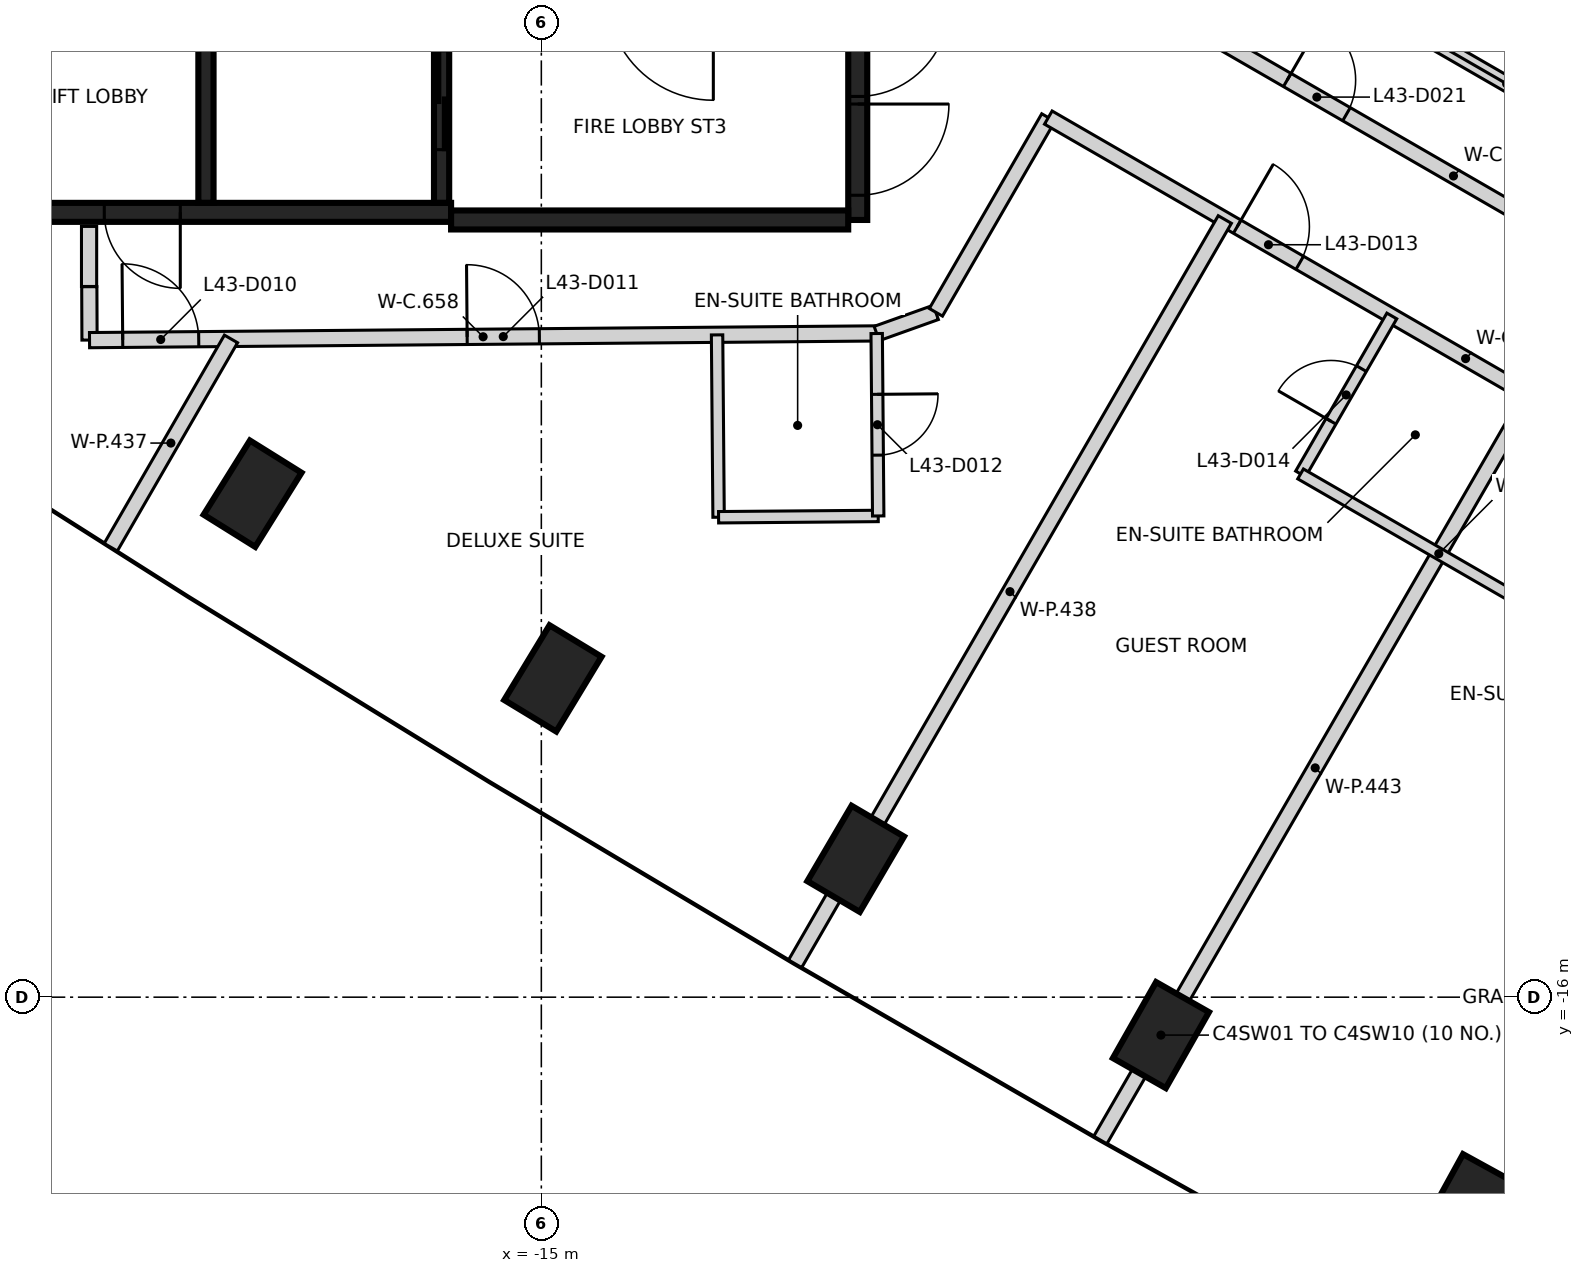
"""IFC4 building model, lengths in metres.
Left out: names, types, materials, properties, quantities, classifications, styles, units other than length and angle.
Written with IfcOpenShell. Run it as: python <this file> out.ifc"""

import sys

from ifc_helpers import new_model, si_unit, direction, frame, frame_2d, origin, origin_2d, place, context, subcontext, project, spatial, rectangle, extrude, element, fill, save


model = new_model("IFC4")
c1 = context("Model", 3, precision=1e-05, world=origin(), true_north=direction((0.0, 1.0)))
c2 = subcontext(c1, "Body", "Model", "MODEL_VIEW")
j1 = project(units=[si_unit("LENGTHUNIT", "METRE"), si_unit("PLANEANGLEUNIT", "RADIAN")], contexts=[c1])
p1 = place(None, origin())
s1 = spatial("IfcSite", under=j1, at=p1, CompositionType="ELEMENT")
p2 = place(p1, origin())
s2 = spatial("IfcBuilding", under=s1, at=p2, CompositionType="ELEMENT")
p3 = place(p2, frame((0.0, 0.0, 175.6)))
s3 = spatial("IfcBuildingStorey", under=s2, at=p3, CompositionType="ELEMENT", Elevation=175.6)
for number, where, z_axis, x_axis in (
    (1, (-18.799, -9.376, -0.35), (0.0, 0.0, 1.0), (0.529, 0.848, 0.0)),
    (2, (-14.848, -11.806, -0.35), (0.0, 0.0, 1.0), (0.518, 0.855, 0.0)),
    (3, (-10.864, -14.18, -0.35), (0.0, 0.0, 1.0), (0.506, 0.862, 0.0)),
    (4, (-6.848, -16.499, -0.35), (0.0, 0.0, 1.0), (0.494, 0.87, 0.0)),
    (5, (-2.8, -18.762, -0.35), (0.0, 0.0, 1.0), (0.482, 0.876, 0.0)),
):
    element("IfcColumn", number, at=place(p3, frame(where, z_axis=z_axis, x_axis=x_axis)), inside=s3, PredefinedType="COLUMN", context=c2, shape_type="SweptSolid", body=[
        extrude(rectangle(XDim=1.15, YDim=0.8, at=origin_2d()), origin(), (0.0, 0.0, 1.0), 3.6),
    ])
p4 = place(p3, frame((-10.837, 5.775, 0.0), z_axis=(0.0, 0.0, 1.0), x_axis=(0.0, -1.0, 0.0)))
e6 = element("IfcWall", 6, at=p4, inside=s3, PredefinedType="SHEAR", context=c2, shape_type="SweptSolid", body=[
    extrude(rectangle(XDim=11.55, YDim=0.25, at=frame_2d((5.775, 0.0))), origin(), (0.0, 0.0, 1.0), 3.25),
])
p5 = place(p4, frame((10.025, 0.0, 0.0)))
e7 = element("IfcOpeningElement", 7, at=p5, cuts=e6, PredefinedType="OPENING", context=c2, shape_type="SweptSolid", body=[
    extrude(rectangle(XDim=1.2, YDim=2.1, at=frame_2d((0.6, 1.05))), frame((0.0, 0.135, 0.0), z_axis=(0.0, -1.0, 0.0), x_axis=(1.0, 0.0, 0.0)), (0.0, 0.0, 1.0), 0.27),
])
p6 = place(p4, frame((8.725, 0.0, 0.0)))
e8 = element("IfcOpeningElement", 8, at=p6, cuts=e6, PredefinedType="OPENING", context=c2, shape_type="SweptSolid", body=[
    extrude(rectangle(XDim=1.2, YDim=2.1, at=frame_2d((0.6, 1.05))), frame((0.0, 0.135, 0.0), z_axis=(0.0, -1.0, 0.0), x_axis=(1.0, 0.0, 0.0)), (0.0, 0.0, 1.0), 0.27),
])
p7 = place(p3, frame((-16.187, -5.675, 0.0), z_axis=(0.0, 0.0, 1.0), x_axis=(-1.0, 0.0, 0.0)))
e9 = element("IfcWall", 9, at=p7, inside=s3, PredefinedType="SHEAR", context=c2, shape_type="SweptSolid", body=[
    extrude(rectangle(XDim=6.25, YDim=0.25, at=frame_2d((3.125, 0.0))), origin(), (0.0, 0.0, 1.0), 3.25),
])
p8 = place(p7, frame((3.563, 0.0, 0.0)))
e10 = element("IfcOpeningElement", 10, at=p8, cuts=e9, PredefinedType="OPENING", context=c2, shape_type="SweptSolid", body=[
    extrude(rectangle(XDim=1.0, YDim=2.1, at=frame_2d((0.5, 1.05))), frame((0.0, 0.135, 0.0), z_axis=(0.0, -1.0, 0.0), x_axis=(1.0, 0.0, 0.0)), (0.0, 0.0, 1.0), 0.27),
])
p9 = place(p3, frame((-10.963, -5.775, 0.0), z_axis=(0.0, 0.0, 1.0), x_axis=(-1.0, 0.0, 0.0)))
e11 = element("IfcWall", 11, at=p9, inside=s3, PredefinedType="SHEAR", context=c2, shape_type="SweptSolid", body=[
    extrude(rectangle(XDim=5.225, YDim=0.25, at=frame_2d((2.612, 0.0))), origin(), (0.0, 0.0, 1.0), 3.25),
])
p10 = place(p3, frame((-16.312, -2.898, 0.0), z_axis=(0.0, 0.0, 1.0), x_axis=(0.0, -1.0, 0.0)))
e12 = element("IfcWall", 12, at=p10, inside=s3, PredefinedType="SHEAR", context=c2, shape_type="SweptSolid", body=[
    extrude(rectangle(XDim=2.651, YDim=0.2, at=frame_2d((1.325, 0.0))), origin(), (0.0, 0.0, 1.0), 3.25),
])
p11 = place(p10, frame((0.652, 0.0, 0.0)))
e13 = element("IfcOpeningElement", 13, at=p11, cuts=e12, PredefinedType="OPENING", context=c2, shape_type="SweptSolid", body=[
    extrude(rectangle(XDim=1.3, YDim=2.1, at=frame_2d((0.65, 1.05))), frame((0.0, 0.11, 0.0), z_axis=(0.0, -1.0, 0.0), x_axis=(1.0, 0.0, 0.0)), (0.0, 0.0, 1.0), 0.22),
])
p12 = place(p3, frame((-19.412, -5.549, 0.0), z_axis=(0.0, 0.0, 1.0), x_axis=(0.0, 1.0, 0.0)))
e14 = element("IfcWall", 14, at=p12, inside=s3, PredefinedType="SHEAR", context=c2, shape_type="SweptSolid", body=[
    extrude(rectangle(XDim=2.651, YDim=0.2, at=frame_2d((1.325, 0.0))), origin(), (0.0, 0.0, 1.0), 3.25),
])
p13 = place(p3, frame((-20.95, -6.65, 0.0), z_axis=(0.0, 0.0, 1.0), x_axis=(0.0, 1.0, 0.0)))
e15 = element("IfcWall", 15, at=p13, inside=s3, PredefinedType="PARTITIONING", context=c2, shape_type="SweptSolid", body=[
    extrude(rectangle(XDim=0.79, YDim=0.2, at=frame_2d((0.395, 0.0))), origin(), (0.0, 0.0, 1.0), 3.25),
])
p14 = place(p3, frame((-20.947, -6.653, 0.0), z_axis=(0.0, 0.0, 1.0), x_axis=(0.004173876686, -0.999991289339, 0.0)))
e16 = element("IfcWall", 16, at=p14, inside=s3, PredefinedType="PARTITIONING", context=c2, shape_type="SweptSolid", body=[
    extrude(rectangle(XDim=0.702, YDim=0.2, at=frame_2d((0.351, 0.0))), origin(), (0.0, 0.0, 1.0), 3.25),
])
p15 = place(p3, frame((-20.944, -7.356, 0.0), z_axis=(0.0, 0.0, 1.0), x_axis=(0.999963588164, 0.008533600955, 0.0)))
e17 = element("IfcWall", 17, at=p15, inside=s3, PredefinedType="PARTITIONING", context=c2, shape_type="SweptSolid", body=[
    extrude(rectangle(XDim=10.357, YDim=0.2, at=frame_2d((5.178, 0.0))), origin(), (0.0, 0.0, 1.0), 3.25),
])
p16 = place(p15, frame((0.437, 0.0, 0.0)))
e18 = element("IfcOpeningElement", 18, at=p16, cuts=e17, PredefinedType="OPENING", context=c2, shape_type="SweptSolid", body=[
    extrude(rectangle(XDim=1.0, YDim=2.1, at=frame_2d((0.5, 1.05))), frame((0.0, 0.11, 0.0), z_axis=(0.0, -1.0, 0.0), x_axis=(1.0, 0.0, 0.0)), (0.0, 0.0, 1.0), 0.22),
])
p17 = place(p15, frame((4.968, 0.0, 0.0)))
e19 = element("IfcOpeningElement", 19, at=p17, cuts=e17, PredefinedType="OPENING", context=c2, shape_type="SweptSolid", body=[
    extrude(rectangle(XDim=0.95, YDim=2.1, at=frame_2d((0.475, 1.05))), frame((0.0, 0.11, 0.0), z_axis=(0.0, -1.0, 0.0), x_axis=(1.0, 0.0, 0.0)), (0.0, 0.0, 1.0), 0.22),
])
p18 = place(p3, frame((-10.588, -7.269, 0.0), z_axis=(0.0, 0.0, 1.0), x_axis=(0.941634876095, 0.336635945974, 0.0)))
e20 = element("IfcWall", 20, at=p18, inside=s3, PredefinedType="PARTITIONING", context=c2, shape_type="SweptSolid", body=[
    extrude(rectangle(XDim=0.826, YDim=0.2, at=frame_2d((0.413, 0.0))), origin(), (0.0, 0.0, 1.0), 3.25),
])
p19 = place(p3, frame((-9.809, -6.99, 0.0), z_axis=(0.0, 0.0, 1.0), x_axis=(0.499955822529, 0.866050908157, 0.0)))
e21 = element("IfcWall", 21, at=p19, inside=s3, PredefinedType="PARTITIONING", context=c2, shape_type="SweptSolid", body=[
    extrude(rectangle(XDim=2.958, YDim=0.2, at=frame_2d((1.479, 0.0))), origin(), (0.0, 0.0, 1.0), 3.25),
])
p20 = place(p3, frame((-8.612, -1.956, 0.0), z_axis=(0.0, 0.0, 1.0), x_axis=(0.866034386606, -0.499984440973, 0.0)))
e22 = element("IfcWall", 22, at=p20, inside=s3, PredefinedType="PARTITIONING", context=c2, shape_type="SweptSolid", body=[
    extrude(rectangle(XDim=12.96, YDim=0.2, at=frame_2d((6.48, 0.0))), origin(), (0.0, 0.0, 1.0), 3.25),
])
p21 = place(p20, frame((3.955, 0.0, 0.0)))
e23 = element("IfcOpeningElement", 23, at=p21, cuts=e22, PredefinedType="OPENING", context=c2, shape_type="SweptSolid", body=[
    extrude(rectangle(XDim=0.9, YDim=2.1, at=frame_2d((0.45, 1.05))), frame((0.0, 0.11, 0.0), z_axis=(0.0, -1.0, 0.0), x_axis=(1.0, 0.0, 0.0)), (0.0, 0.0, 1.0), 0.22),
])
p22 = place(p20, frame((10.424, 0.0, 0.0)))
e24 = element("IfcOpeningElement", 24, at=p22, cuts=e22, PredefinedType="OPENING", context=c2, shape_type="SweptSolid", body=[
    extrude(rectangle(XDim=0.9, YDim=2.1, at=frame_2d((0.45, 1.05))), frame((0.0, 0.11, 0.0), z_axis=(0.0, -1.0, 0.0), x_axis=(1.0, 0.0, 0.0)), (0.0, 0.0, 1.0), 0.22),
])
p23 = place(p3, frame((-8.33, -4.428, 0.0), z_axis=(0.0, 0.0, 1.0), x_axis=(0.865923263811, -0.500176869909, 0.0)))
e25 = element("IfcWall", 25, at=p23, inside=s3, PredefinedType="PARTITIONING", context=c2, shape_type="SweptSolid", body=[
    extrude(rectangle(XDim=12.68, YDim=0.2, at=frame_2d((6.34, 0.0))), origin(), (0.0, 0.0, 1.0), 3.25),
])
p24 = place(p23, frame((2.87, 0.0, 0.0)))
e26 = element("IfcOpeningElement", 26, at=p24, cuts=e25, PredefinedType="OPENING", context=c2, shape_type="SweptSolid", body=[
    extrude(rectangle(XDim=0.95, YDim=2.1, at=frame_2d((0.475, 1.05))), frame((0.0, 0.11, 0.0), z_axis=(0.0, -1.0, 0.0), x_axis=(1.0, 0.0, 0.0)), (0.0, 0.0, 1.0), 0.22),
])
p25 = place(p23, frame((11.5, 0.0, 0.0)))
e27 = element("IfcOpeningElement", 27, at=p25, cuts=e25, PredefinedType="OPENING", context=c2, shape_type="SweptSolid", body=[
    extrude(rectangle(XDim=0.95, YDim=2.1, at=frame_2d((0.475, 1.05))), frame((0.0, 0.11, 0.0), z_axis=(0.0, -1.0, 0.0), x_axis=(1.0, 0.0, 0.0)), (0.0, 0.0, 1.0), 0.22),
])
p26 = place(p3, frame((-20.665, -10.08, 0.0), z_axis=(0.0, 0.0, 1.0), x_axis=(0.499931743679, 0.866064808003, 0.0)))
e28 = element("IfcWall", 28, at=p26, inside=s3, PredefinedType="PARTITIONING", context=c2, shape_type="SweptSolid", body=[
    extrude(rectangle(XDim=3.164, YDim=0.2, at=frame_2d((1.582, 0.0))), origin(), (0.0, 0.0, 1.0), 2.35),
])
p27 = place(p3, frame((-11.661, -15.561, 0.0), z_axis=(0.0, 0.0, 1.0), x_axis=(0.500012795616, 0.866018016106, 0.0)))
e29 = element("IfcWall", 29, at=p27, inside=s3, PredefinedType="PARTITIONING", context=c2, shape_type="SweptSolid", body=[
    extrude(rectangle(XDim=11.306, YDim=0.2, at=frame_2d((5.653, 0.0))), origin(), (0.0, 0.0, 1.0), 3.25),
])
p28 = place(p3, frame((-7.6, -0.924, 0.0), z_axis=(0.0, 0.0, 1.0), x_axis=(0.866028806638, -0.499994106039, 0.0)))
e30 = element("IfcWall", 30, at=p28, inside=s3, PredefinedType="PARTITIONING", context=c2, shape_type="SweptSolid", body=[
    extrude(rectangle(XDim=12.24, YDim=0.2, at=frame_2d((6.12, 0.0))), origin(), (0.0, 0.0, 1.0), 3.25),
])
p29 = place(p3, frame((-7.646, -17.879, 0.0), z_axis=(0.0, 0.0, 1.0), x_axis=(0.500031496802, 0.866007218334, 0.0)))
e31 = element("IfcWall", 31, at=p29, inside=s3, PredefinedType="PARTITIONING", context=c2, shape_type="SweptSolid", body=[
    extrude(rectangle(XDim=11.306, YDim=0.2, at=frame_2d((5.653, 0.0))), origin(), (0.0, 0.0, 1.0), 3.25),
])
p30 = place(p3, frame((-12.688, -7.287, 0.0), z_axis=(0.0, 0.0, 1.0), x_axis=(0.00834491602, -0.999965180582, 0.0)))
e32 = element("IfcWall", 32, at=p30, inside=s3, PredefinedType="PARTITIONING", context=c2, shape_type="SweptSolid", body=[
    extrude(rectangle(XDim=2.399, YDim=0.15, at=frame_2d((1.199, 0.0))), origin(), (0.0, 0.0, 1.0), 3.25),
])
p31 = place(p3, frame((-12.668, -9.686, 0.0), z_axis=(0.0, 0.0, 1.0), x_axis=(0.999966883333, 0.008138319013, 0.0)))
e33 = element("IfcWall", 33, at=p31, inside=s3, PredefinedType="PARTITIONING", context=c2, shape_type="SweptSolid", body=[
    extrude(rectangle(XDim=2.1, YDim=0.15, at=frame_2d((1.05, 0.0))), origin(), (0.0, 0.0, 1.0), 3.25),
])
p32 = place(p3, frame((-10.588, -7.269, 0.0), z_axis=(0.0, 0.0, 1.0), x_axis=(0.008239801651, -0.999966052258, 0.0)))
e34 = element("IfcWall", 34, at=p32, inside=s3, PredefinedType="PARTITIONING", context=c2, shape_type="SweptSolid", body=[
    extrude(rectangle(XDim=2.4, YDim=0.15, at=frame_2d((1.2, 0.0))), origin(), (0.0, 0.0, 1.0), 3.25),
])
p33 = place(p32, frame((0.8, 0.0, 0.0)))
e35 = element("IfcOpeningElement", 35, at=p33, cuts=e34, PredefinedType="OPENING", context=c2, shape_type="SweptSolid", body=[
    extrude(rectangle(XDim=0.8, YDim=2.1, at=frame_2d((0.4, 1.05))), frame((0.0, 0.085, 0.0), z_axis=(0.0, -1.0, 0.0), x_axis=(1.0, 0.0, 0.0)), (0.0, 0.0, 1.0), 0.17),
])
p34 = place(p3, frame((-5.011, -9.116, 0.0), z_axis=(0.0, 0.0, 1.0), x_axis=(0.500089422704, 0.865973769406, 0.0)))
e36 = element("IfcWall", 36, at=p34, inside=s3, PredefinedType="PARTITIONING", context=c2, shape_type="SweptSolid", body=[
    extrude(rectangle(XDim=2.399, YDim=0.15, at=frame_2d((1.2, 0.0))), origin(), (0.0, 0.0, 1.0), 3.25),
])
p35 = place(p34, frame((0.8, 0.0, 0.0)))
e37 = element("IfcOpeningElement", 37, at=p35, cuts=e36, PredefinedType="OPENING", context=c2, shape_type="SweptSolid", body=[
    extrude(rectangle(XDim=0.8, YDim=2.1, at=frame_2d((0.4, 1.05))), frame((0.0, 0.085, 0.0), z_axis=(0.0, -1.0, 0.0), x_axis=(1.0, 0.0, 0.0)), (0.0, 0.0, 1.0), 0.17),
])
p36 = place(p3, frame((-5.011, -9.116, 0.0), z_axis=(0.0, 0.0, 1.0), x_axis=(0.866062607352, -0.499935555993, 0.0)))
e38 = element("IfcWall", 38, at=p36, inside=s3, PredefinedType="PARTITIONING", context=c2, shape_type="SweptSolid", body=[
    extrude(rectangle(XDim=4.198, YDim=0.15, at=frame_2d((2.099, 0.0))), origin(), (0.0, 0.0, 1.0), 3.25),
])
p37 = place(p11, origin())
e39 = element("IfcDoor", 39, at=p37, inside=s3, OperationType="SLIDING_TO_RIGHT", PredefinedType="DOOR", context=c2, shape_type="SweptSolid", body=[
    extrude(rectangle(XDim=1.3, YDim=2.1, at=frame_2d((0.65, 1.05))), frame((0.0, 0.025, 0.0), z_axis=(0.0, -1.0, 0.0), x_axis=(1.0, 0.0, 0.0)), (0.0, 0.0, 1.0), 0.05),
])
fill(e13, e39)
p38 = place(p8, origin())
e40 = element("IfcDoor", 40, at=p38, inside=s3, OperationType="SINGLE_SWING_LEFT", PredefinedType="DOOR", context=c2, shape_type="SweptSolid", body=[
    extrude(rectangle(XDim=1.0, YDim=2.1, at=frame_2d((0.5, 1.05))), frame((0.0, 0.025, 0.0), z_axis=(0.0, -1.0, 0.0), x_axis=(1.0, 0.0, 0.0)), (0.0, 0.0, 1.0), 0.05),
])
fill(e10, e40)
p39 = place(p5, origin())
e41 = element("IfcDoor", 41, at=p39, inside=s3, OperationType="SINGLE_SWING_LEFT", PredefinedType="DOOR", context=c2, shape_type="SweptSolid", body=[
    extrude(rectangle(XDim=1.2, YDim=2.1, at=frame_2d((0.6, 1.05))), frame((0.0, 0.025, 0.0), z_axis=(0.0, -1.0, 0.0), x_axis=(1.0, 0.0, 0.0)), (0.0, 0.0, 1.0), 0.05),
])
fill(e7, e41)
p40 = place(p6, origin())
e42 = element("IfcDoor", 42, at=p40, inside=s3, OperationType="SINGLE_SWING_RIGHT", PredefinedType="DOOR", context=c2, shape_type="SweptSolid", body=[
    extrude(rectangle(XDim=1.2, YDim=2.1, at=frame_2d((0.6, 1.05))), frame((0.0, 0.025, 0.0), z_axis=(0.0, -1.0, 0.0), x_axis=(1.0, 0.0, 0.0)), (0.0, 0.0, 1.0), 0.05),
])
fill(e8, e42)
p41 = place(p16, origin())
e43 = element("IfcDoor", 43, at=p41, inside=s3, OperationType="SINGLE_SWING_LEFT", PredefinedType="DOOR", context=c2, shape_type="SweptSolid", body=[
    extrude(rectangle(XDim=1.0, YDim=2.1, at=frame_2d((0.5, 1.05))), frame((0.0, 0.025, 0.0), z_axis=(0.0, -1.0, 0.0), x_axis=(1.0, 0.0, 0.0)), (0.0, 0.0, 1.0), 0.05),
])
fill(e18, e43)
p42 = place(p17, frame((0.95, 0.0, 0.0), z_axis=(0.0, 0.0, 1.0), x_axis=(-1.0, 0.0, 0.0)))
e44 = element("IfcDoor", 44, at=p42, inside=s3, OperationType="SINGLE_SWING_LEFT", PredefinedType="DOOR", context=c2, shape_type="SweptSolid", body=[
    extrude(rectangle(XDim=0.95, YDim=2.1, at=frame_2d((0.475, 1.05))), frame((0.0, 0.025, 0.0), z_axis=(0.0, -1.0, 0.0), x_axis=(1.0, 0.0, 0.0)), (0.0, 0.0, 1.0), 0.05),
])
fill(e19, e44)
p43 = place(p33, frame((0.8, 0.0, 0.0), z_axis=(0.0, 0.0, 1.0), x_axis=(-1.0, 0.0, 0.0)))
e45 = element("IfcDoor", 45, at=p43, inside=s3, OperationType="SINGLE_SWING_LEFT", PredefinedType="DOOR", context=c2, shape_type="SweptSolid", body=[
    extrude(rectangle(XDim=0.8, YDim=2.1, at=frame_2d((0.4, 1.05))), frame((0.0, 0.025, 0.0), z_axis=(0.0, -1.0, 0.0), x_axis=(1.0, 0.0, 0.0)), (0.0, 0.0, 1.0), 0.05),
])
fill(e35, e45)
p44 = place(p24, frame((0.95, 0.0, 0.0), z_axis=(0.0, 0.0, 1.0), x_axis=(-1.0, 0.0, 0.0)))
e46 = element("IfcDoor", 46, at=p44, inside=s3, OperationType="SINGLE_SWING_LEFT", PredefinedType="DOOR", context=c2, shape_type="SweptSolid", body=[
    extrude(rectangle(XDim=0.95, YDim=2.1, at=frame_2d((0.475, 1.05))), frame((0.0, 0.025, 0.0), z_axis=(0.0, -1.0, 0.0), x_axis=(1.0, 0.0, 0.0)), (0.0, 0.0, 1.0), 0.05),
])
fill(e26, e46)
p45 = place(p35, origin())
e47 = element("IfcDoor", 47, at=p45, inside=s3, OperationType="SINGLE_SWING_LEFT", PredefinedType="DOOR", context=c2, shape_type="SweptSolid", body=[
    extrude(rectangle(XDim=0.8, YDim=2.1, at=frame_2d((0.4, 1.05))), frame((0.0, 0.025, 0.0), z_axis=(0.0, -1.0, 0.0), x_axis=(1.0, 0.0, 0.0)), (0.0, 0.0, 1.0), 0.05),
])
fill(e37, e47)
p46 = place(p21, origin())
e48 = element("IfcDoor", 48, at=p46, inside=s3, OperationType="SINGLE_SWING_LEFT", PredefinedType="DOOR", context=c2, shape_type="SweptSolid", body=[
    extrude(rectangle(XDim=0.9, YDim=2.1, at=frame_2d((0.45, 1.05))), frame((0.0, 0.025, 0.0), z_axis=(0.0, -1.0, 0.0), x_axis=(1.0, 0.0, 0.0)), (0.0, 0.0, 1.0), 0.05),
])
fill(e23, e48)
save(model, sys.argv[1])
